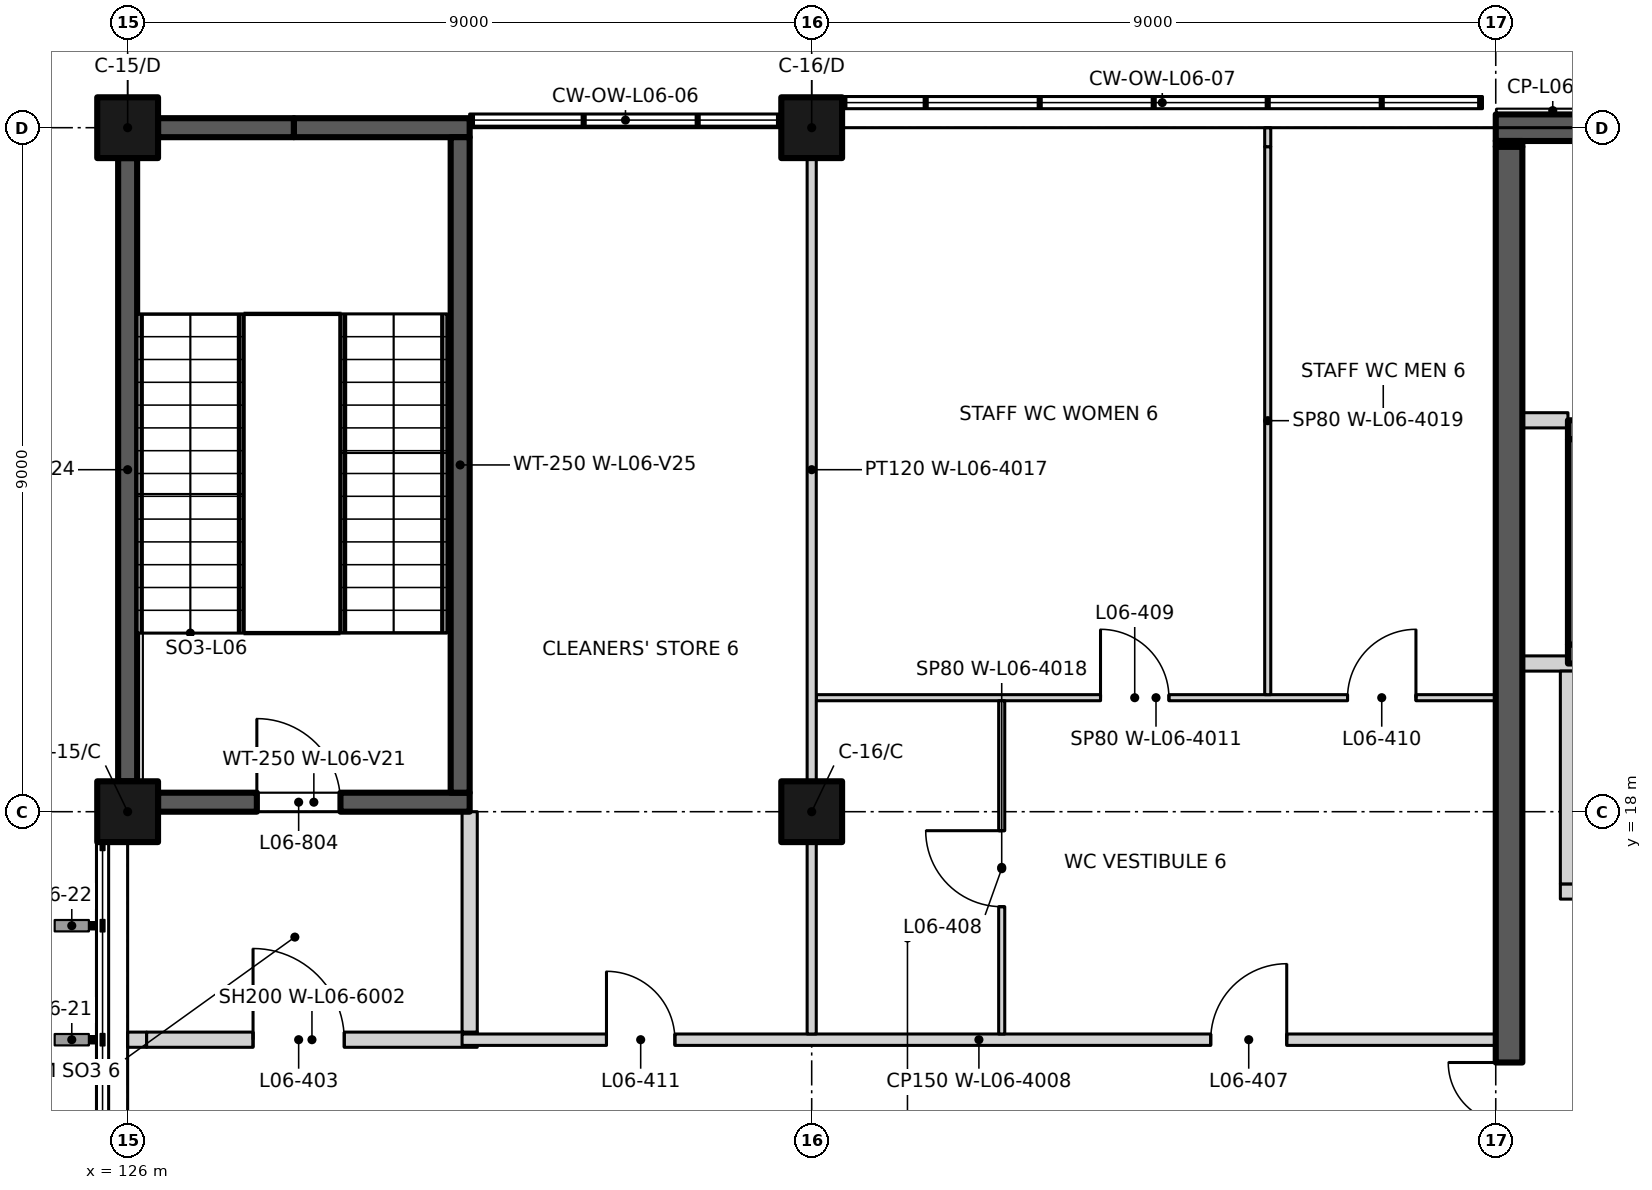
"""IFC4 building model, lengths in metres.
Left out: names, types, materials, properties, quantities, classifications, styles, units other than length and angle.
Written with IfcOpenShell. Run it as: python <this file> out.ifc"""

import sys

from ifc_helpers import new_model, si_unit, direction, frame, frame_2d, origin, origin_2d, place, context, subcontext, project, spatial, rectangle, extrude, element, fill, save


model = new_model("IFC4")
c1 = context("Model", 3, precision=1e-05, world=origin(), true_north=direction((0.0, 1.0)))
c2 = subcontext(c1, "Body", "Model", "MODEL_VIEW")
j1 = project(units=[si_unit("LENGTHUNIT", "METRE"), si_unit("PLANEANGLEUNIT", "RADIAN")], contexts=[c1])
p1 = place(None, origin())
s1 = spatial("IfcSite", under=j1, at=p1, CompositionType="ELEMENT")
p2 = place(p1, origin())
s2 = spatial("IfcBuilding", under=s1, at=p2, CompositionType="ELEMENT")
p3 = place(p2, frame((0.0, 0.0, 28.5)))
s3 = spatial("IfcBuildingStorey", under=s2, at=p3, CompositionType="ELEMENT", Elevation=28.5)
for number, where, z_axis, x_axis in (
    (1, (126.0, 18.0, 0.0), (0.0, 0.0, 1.0), (1.0, 0.0, 0.0)),
    (2, (135.0, 18.0, 0.0), (0.0, 0.0, 1.0), (1.0, 0.0, 0.0)),
    (3, (126.0, 27.0, 0.0), (0.0, 0.0, 1.0), (1.0, 0.0, 0.0)),
    (4, (135.0, 27.0, 0.0), (0.0, 0.0, 1.0), (1.0, 0.0, 0.0)),
):
    element("IfcColumn", number, at=place(p3, frame(where, z_axis=z_axis, x_axis=x_axis)), inside=s3, PredefinedType="COLUMN", context=c2, shape_type="SweptSolid", body=[
        extrude(rectangle(XDim=0.8, YDim=0.8, at=origin_2d()), origin(), (0.0, 0.0, 1.0), 4.5),
    ])
p4 = place(p3, frame((126.4, 18.125, 0.0), z_axis=(0.0, 0.0, 1.0), x_axis=(1.0, 0.0, 0.0)))
e5 = element("IfcWall", 5, at=p4, inside=s3, PredefinedType="SHEAR", context=c2, shape_type="SweptSolid", body=[
    extrude(rectangle(XDim=4.1, YDim=0.25, at=frame_2d((2.05, 0.0))), origin(), (0.0, 0.0, 1.0), 4.5),
])
p5 = place(p4, frame((1.3, 0.0, 0.0)))
e6 = element("IfcOpeningElement", 6, at=p5, cuts=e5, PredefinedType="OPENING", context=c2, shape_type="SweptSolid", body=[
    extrude(rectangle(XDim=1.1, YDim=2.1, at=frame_2d((0.55, 1.05))), frame((0.0, 0.135, 0.0), z_axis=(0.0, -1.0, 0.0), x_axis=(1.0, 0.0, 0.0)), (0.0, 0.0, 1.0), 0.27),
])
p6 = place(p3, frame((126.4, 27.0, 0.0), z_axis=(0.0, 0.0, 1.0), x_axis=(1.0, 0.0, 0.0)))
e7 = element("IfcWall", 7, at=p6, inside=s3, PredefinedType="SHEAR", context=c2, shape_type="SweptSolid", body=[
    extrude(rectangle(XDim=1.788, YDim=0.25, at=frame_2d((0.894, 0.0))), origin(), (0.0, 0.0, 1.0), 4.5),
])
p7 = place(p3, frame((128.188, 27.0, 0.0), z_axis=(0.0, 0.0, 1.0), x_axis=(1.0, 0.0, 0.0)))
e8 = element("IfcWall", 8, at=p7, inside=s3, PredefinedType="SHEAR", context=c2, shape_type="SweptSolid", body=[
    extrude(rectangle(XDim=2.312, YDim=0.25, at=frame_2d((1.156, 0.0))), origin(), (0.0, 0.0, 1.0), 4.5),
])
p8 = place(p3, frame((126.0, 18.4, 0.0), z_axis=(0.0, 0.0, 1.0), x_axis=(0.0, 1.0, 0.0)))
e9 = element("IfcWall", 9, at=p8, inside=s3, PredefinedType="SHEAR", context=c2, shape_type="SweptSolid", body=[
    extrude(rectangle(XDim=8.2, YDim=0.25, at=frame_2d((4.1, 0.0))), origin(), (0.0, 0.0, 1.0), 4.5),
])
p9 = place(p3, frame((130.375, 18.25, 0.0), z_axis=(0.0, 0.0, 1.0), x_axis=(0.0, 1.0, 0.0)))
e10 = element("IfcWall", 10, at=p9, inside=s3, PredefinedType="SHEAR", context=c2, shape_type="SweptSolid", body=[
    extrude(rectangle(XDim=8.625, YDim=0.25, at=frame_2d((4.312, 0.0))), origin(), (0.0, 0.0, 1.0), 4.5),
])
p10 = place(p3, frame((144.95, 20.075, 0.0), z_axis=(0.0, 0.0, 1.0), x_axis=(1.0, 0.0, 0.0)))
e11 = element("IfcWall", 11, at=p10, inside=s3, PredefinedType="SHEAR", context=c2, shape_type="SweptSolid", body=[
    extrude(rectangle(XDim=6.15, YDim=0.25, at=frame_2d((3.075, 0.0))), origin(), (0.0, 0.0, 1.0), 4.5),
])
p11 = place(p10, frame((1.05, 0.0, 0.0)))
e12 = element("IfcOpeningElement", 12, at=p11, cuts=e11, PredefinedType="OPENING", context=c2, shape_type="SweptSolid", body=[
    extrude(rectangle(XDim=1.1, YDim=2.1, at=frame_2d((0.55, 1.05))), frame((0.0, 0.135, 0.0), z_axis=(0.0, -1.0, 0.0), x_axis=(1.0, 0.0, 0.0)), (0.0, 0.0, 1.0), 0.27),
])
p12 = place(p10, frame((4.0, 0.0, 0.0)))
e13 = element("IfcOpeningElement", 13, at=p12, cuts=e11, PredefinedType="OPENING", context=c2, shape_type="SweptSolid", body=[
    extrude(rectangle(XDim=1.1, YDim=2.1, at=frame_2d((0.55, 1.05))), frame((0.0, 0.135, 0.0), z_axis=(0.0, -1.0, 0.0), x_axis=(1.0, 0.0, 0.0)), (0.0, 0.0, 1.0), 0.27),
])
p13 = place(p3, frame((144.95, 23.025, 0.0), z_axis=(0.0, 0.0, 1.0), x_axis=(1.0, 0.0, 0.0)))
e14 = element("IfcWall", 14, at=p13, inside=s3, PredefinedType="SHEAR", context=c2, shape_type="SweptSolid", body=[
    extrude(rectangle(XDim=6.15, YDim=0.25, at=frame_2d((3.075, 0.0))), origin(), (0.0, 0.0, 1.0), 4.5),
])
p14 = place(p3, frame((145.075, 20.2, 0.0), z_axis=(0.0, 0.0, 1.0), x_axis=(0.0, 1.0, 0.0)))
e15 = element("IfcWall", 15, at=p14, inside=s3, PredefinedType="SHEAR", context=c2, shape_type="SweptSolid", body=[
    extrude(rectangle(XDim=2.7, YDim=0.25, at=frame_2d((1.35, 0.0))), origin(), (0.0, 0.0, 1.0), 4.5),
])
p15 = place(p3, frame((144.0, 27.0, 0.0), z_axis=(0.0, 0.0, 1.0), x_axis=(1.0, 0.0, 0.0)))
e16 = element("IfcWall", 16, at=p15, inside=s3, PredefinedType="SOLIDWALL", context=c2, shape_type="SweptSolid", body=[
    extrude(rectangle(XDim=18.0, YDim=0.35, at=frame_2d((9.0, 0.0))), origin(), (0.0, 0.0, 1.0), 3.6),
])
p16 = place(p15, frame((4.2, 0.0, 0.6)))
e17 = element("IfcOpeningElement", 17, at=p16, cuts=e16, PredefinedType="OPENING", context=c2, shape_type="SweptSolid", body=[
    extrude(rectangle(XDim=0.6, YDim=2.4, at=frame_2d((0.3, 1.2))), frame((0.0, 0.185, 0.0), z_axis=(0.0, -1.0, 0.0), x_axis=(1.0, 0.0, 0.0)), (0.0, 0.0, 1.0), 0.37),
])
p17 = place(p15, frame((13.2, 0.0, 0.6)))
e18 = element("IfcOpeningElement", 18, at=p17, cuts=e16, PredefinedType="OPENING", context=c2, shape_type="SweptSolid", body=[
    extrude(rectangle(XDim=0.6, YDim=2.4, at=frame_2d((0.3, 1.2))), frame((0.0, 0.185, 0.0), z_axis=(0.0, -1.0, 0.0), x_axis=(1.0, 0.0, 0.0)), (0.0, 0.0, 1.0), 0.37),
])
p18 = place(p3, frame((126.0, 15.0, 0.0), z_axis=(0.0, 0.0, 1.0), x_axis=(1.0, 0.0, 0.0)))
e19 = element("IfcWall", 19, at=p18, inside=s3, PredefinedType="PARTITIONING", context=c2, shape_type="SweptSolid", body=[
    extrude(rectangle(XDim=0.25, YDim=0.2, at=frame_2d((0.125, 0.0))), origin(), (0.0, 0.0, 1.0), 3.6),
])
p19 = place(p3, frame((126.25, 15.0, 0.0), z_axis=(0.0, 0.0, 1.0), x_axis=(1.0, 0.0, 0.0)))
e20 = element("IfcWall", 20, at=p19, inside=s3, PredefinedType="PARTITIONING", context=c2, shape_type="SweptSolid", body=[
    extrude(rectangle(XDim=4.35, YDim=0.2, at=frame_2d((2.175, 0.0))), origin(), (0.0, 0.0, 1.0), 4.2),
])
p20 = place(p19, frame((1.4, 0.0, 0.0)))
e21 = element("IfcOpeningElement", 21, at=p20, cuts=e20, PredefinedType="OPENING", context=c2, shape_type="SweptSolid", body=[
    extrude(rectangle(XDim=1.2, YDim=2.1, at=frame_2d((0.6, 1.05))), frame((0.0, 0.11, 0.0), z_axis=(0.0, -1.0, 0.0), x_axis=(1.0, 0.0, 0.0)), (0.0, 0.0, 1.0), 0.22),
])
p21 = place(p3, frame((130.4, 15.0, 0.0), z_axis=(0.0, 0.0, 1.0), x_axis=(1.0, 0.0, 0.0)))
e22 = element("IfcWall", 22, at=p21, inside=s3, PredefinedType="PARTITIONING", context=c2, shape_type="SweptSolid", body=[
    extrude(rectangle(XDim=13.6, YDim=0.15, at=frame_2d((6.8, 0.0))), origin(), (0.0, 0.0, 1.0), 4.2),
])
p22 = place(p21, frame((9.85, 0.0, 0.0)))
e23 = element("IfcOpeningElement", 23, at=p22, cuts=e22, PredefinedType="OPENING", context=c2, shape_type="SweptSolid", body=[
    extrude(rectangle(XDim=1.0, YDim=2.1, at=frame_2d((0.5, 1.05))), frame((0.0, 0.085, 0.0), z_axis=(0.0, -1.0, 0.0), x_axis=(1.0, 0.0, 0.0)), (0.0, 0.0, 1.0), 0.17),
])
p23 = place(p21, frame((1.9, 0.0, 0.0)))
e24 = element("IfcOpeningElement", 24, at=p23, cuts=e22, PredefinedType="OPENING", context=c2, shape_type="SweptSolid", body=[
    extrude(rectangle(XDim=0.9, YDim=2.1, at=frame_2d((0.45, 1.05))), frame((0.0, 0.085, 0.0), z_axis=(0.0, -1.0, 0.0), x_axis=(1.0, 0.0, 0.0)), (0.0, 0.0, 1.0), 0.17),
])
p24 = place(p3, frame((144.85, 16.95, 0.0), z_axis=(0.0, 0.0, 1.0), x_axis=(1.0, 0.0, 0.0)))
e25 = element("IfcWall", 25, at=p24, inside=s3, PredefinedType="PARTITIONING", context=c2, shape_type="SweptSolid", body=[
    extrude(rectangle(XDim=6.35, YDim=0.2, at=frame_2d((3.175, 0.0))), origin(), (0.0, 0.0, 1.0), 4.2),
])
p25 = place(p24, frame((2.575, 0.0, 0.0)))
e26 = element("IfcOpeningElement", 26, at=p25, cuts=e25, PredefinedType="OPENING", context=c2, shape_type="SweptSolid", body=[
    extrude(rectangle(XDim=1.2, YDim=2.1, at=frame_2d((0.6, 1.05))), frame((0.0, 0.11, 0.0), z_axis=(0.0, -1.0, 0.0), x_axis=(1.0, 0.0, 0.0)), (0.0, 0.0, 1.0), 0.22),
])
p26 = place(p3, frame((135.06, 19.5, 0.0), z_axis=(0.0, 0.0, 1.0), x_axis=(1.0, 0.0, 0.0)))
e27 = element("IfcWall", 27, at=p26, inside=s3, PredefinedType="PARTITIONING", context=c2, shape_type="SweptSolid", body=[
    extrude(rectangle(XDim=8.94, YDim=0.08, at=frame_2d((4.47, 0.0))), origin(), (0.0, 0.0, 1.0), 4.2),
])
p27 = place(p26, frame((3.74, 0.0, 0.0)))
e28 = element("IfcOpeningElement", 28, at=p27, cuts=e27, PredefinedType="OPENING", context=c2, shape_type="SweptSolid", body=[
    extrude(rectangle(XDim=0.9, YDim=2.1, at=frame_2d((0.45, 1.05))), frame((0.0, 0.05, 0.0), z_axis=(0.0, -1.0, 0.0), x_axis=(1.0, 0.0, 0.0)), (0.0, 0.0, 1.0), 0.1),
])
p28 = place(p26, frame((6.99, 0.0, 0.0)))
e29 = element("IfcOpeningElement", 29, at=p28, cuts=e27, PredefinedType="OPENING", context=c2, shape_type="SweptSolid", body=[
    extrude(rectangle(XDim=0.9, YDim=2.1, at=frame_2d((0.45, 1.05))), frame((0.0, 0.05, 0.0), z_axis=(0.0, -1.0, 0.0), x_axis=(1.0, 0.0, 0.0)), (0.0, 0.0, 1.0), 0.1),
])
p29 = place(p3, frame((144.35, 19.95, 0.0), z_axis=(0.0, 0.0, 1.0), x_axis=(1.0, 0.0, 0.0)))
e30 = element("IfcWall", 30, at=p29, inside=s3, PredefinedType="PARTITIONING", context=c2, shape_type="SweptSolid", body=[
    extrude(rectangle(XDim=0.7, YDim=0.2, at=frame_2d((0.35, 0.0))), origin(), (0.0, 0.0, 1.0), 4.2),
])
p30 = place(p3, frame((144.35, 23.15, 0.0), z_axis=(0.0, 0.0, 1.0), x_axis=(1.0, 0.0, 0.0)))
e31 = element("IfcWall", 31, at=p30, inside=s3, PredefinedType="PARTITIONING", context=c2, shape_type="SweptSolid", body=[
    extrude(rectangle(XDim=0.6, YDim=0.2, at=frame_2d((0.3, 0.0))), origin(), (0.0, 0.0, 1.0), 4.2),
])
p31 = place(p3, frame((130.5, 15.1, 0.0), z_axis=(0.0, 0.0, 1.0), x_axis=(0.0, 1.0, 0.0)))
e32 = element("IfcWall", 32, at=p31, inside=s3, PredefinedType="PARTITIONING", context=c2, shape_type="SweptSolid", body=[
    extrude(rectangle(XDim=2.9, YDim=0.2, at=frame_2d((1.45, 0.0))), origin(), (0.0, 0.0, 1.0), 4.2),
])
p32 = place(p3, frame((135.0, 15.075, 0.0), z_axis=(0.0, 0.0, 1.0), x_axis=(0.0, 1.0, 0.0)))
e33 = element("IfcWall", 33, at=p32, inside=s3, PredefinedType="PARTITIONING", context=c2, shape_type="SweptSolid", body=[
    extrude(rectangle(XDim=2.525, YDim=0.12, at=frame_2d((1.263, 0.0))), origin(), (0.0, 0.0, 1.0), 4.2),
])
p33 = place(p3, frame((135.0, 18.4, 0.0), z_axis=(0.0, 0.0, 1.0), x_axis=(0.0, 1.0, 0.0)))
e34 = element("IfcWall", 34, at=p33, inside=s3, PredefinedType="PARTITIONING", context=c2, shape_type="SweptSolid", body=[
    extrude(rectangle(XDim=8.2, YDim=0.12, at=frame_2d((4.1, 0.0))), origin(), (0.0, 0.0, 1.0), 4.2),
])
p34 = place(p3, frame((137.5, 15.075, 0.0), z_axis=(0.0, 0.0, 1.0), x_axis=(0.0, 1.0, 0.0)))
e35 = element("IfcWall", 35, at=p34, inside=s3, PredefinedType="PARTITIONING", context=c2, shape_type="SweptSolid", body=[
    extrude(rectangle(XDim=4.385, YDim=0.08, at=frame_2d((2.192, 0.0))), origin(), (0.0, 0.0, 1.0), 4.2),
])
p35 = place(p34, frame((1.675, 0.0, 0.0)))
e36 = element("IfcOpeningElement", 36, at=p35, cuts=e35, PredefinedType="OPENING", context=c2, shape_type="SweptSolid", body=[
    extrude(rectangle(XDim=1.0, YDim=2.1, at=frame_2d((0.5, 1.05))), frame((0.0, 0.05, 0.0), z_axis=(0.0, -1.0, 0.0), x_axis=(1.0, 0.0, 0.0)), (0.0, 0.0, 1.0), 0.1),
])
p36 = place(p3, frame((141.0, 19.54, 0.0), z_axis=(0.0, 0.0, 1.0), x_axis=(0.0, 1.0, 0.0)))
e37 = element("IfcWall", 37, at=p36, inside=s3, PredefinedType="PARTITIONING", context=c2, shape_type="SweptSolid", body=[
    extrude(rectangle(XDim=7.21, YDim=0.08, at=frame_2d((3.605, 0.0))), origin(), (0.0, 0.0, 1.0), 4.2),
])
p37 = place(p3, frame((141.0, 26.75, 0.0), z_axis=(0.0, 0.0, 1.0), x_axis=(0.0, 1.0, 0.0)))
e38 = element("IfcWall", 38, at=p37, inside=s3, PredefinedType="PARTITIONING", context=c2, shape_type="SweptSolid", body=[
    extrude(rectangle(XDim=0.25, YDim=0.08, at=frame_2d((0.125, 0.0))), origin(), (0.0, 0.0, 1.0), 3.6),
])
p38 = place(p3, frame((144.175, 9.35, 0.0), z_axis=(0.0, 0.0, 1.0), x_axis=(0.0, 1.0, 0.0)))
e39 = element("IfcWall", 39, at=p38, inside=s3, PredefinedType="SHEAR", context=c2, shape_type="SweptSolid", body=[
    extrude(rectangle(XDim=17.4, YDim=0.35, at=frame_2d((8.7, 0.0))), origin(), (0.0, 0.0, 1.0), 4.2),
])
p39 = place(p38, frame((3.75, 0.0, 0.0)))
e40 = element("IfcOpeningElement", 40, at=p39, cuts=e39, PredefinedType="OPENING", context=c2, shape_type="SweptSolid", body=[
    extrude(rectangle(XDim=1.6, YDim=2.4, at=frame_2d((0.8, 1.2))), frame((0.0, 0.185, 0.0), z_axis=(0.0, -1.0, 0.0), x_axis=(1.0, 0.0, 0.0)), (0.0, 0.0, 1.0), 0.37),
])
p40 = place(p3, frame((144.175, 26.75, 0.0), z_axis=(0.0, 0.0, 1.0), x_axis=(0.0, 1.0, 0.0)))
e41 = element("IfcWall", 41, at=p40, inside=s3, PredefinedType="SHEAR", context=c2, shape_type="SweptSolid", body=[
    extrude(rectangle(XDim=0.075, YDim=0.35, at=frame_2d((0.038, 0.0))), origin(), (0.0, 0.0, 1.0), 3.6),
])
p41 = place(p3, frame((144.95, 17.05, 0.0), z_axis=(0.0, 0.0, 1.0), x_axis=(0.0, 1.0, 0.0)))
e42 = element("IfcWall", 42, at=p41, inside=s3, PredefinedType="PARTITIONING", context=c2, shape_type="SweptSolid", body=[
    extrude(rectangle(XDim=2.8, YDim=0.2, at=frame_2d((1.4, 0.0))), origin(), (0.0, 0.0, 1.0), 4.2),
])
p42 = place(p5, origin())
e43 = element("IfcDoor", 43, at=p42, inside=s3, OperationType="SINGLE_SWING_LEFT", PredefinedType="DOOR", context=c2, shape_type="SweptSolid", body=[
    extrude(rectangle(XDim=1.1, YDim=2.1, at=frame_2d((0.55, 1.05))), frame((0.0, 0.025, 0.0), z_axis=(0.0, -1.0, 0.0), x_axis=(1.0, 0.0, 0.0)), (0.0, 0.0, 1.0), 0.05),
])
fill(e6, e43)
p43 = place(p20, origin())
e44 = element("IfcDoor", 44, at=p43, inside=s3, OperationType="SINGLE_SWING_LEFT", PredefinedType="DOOR", context=c2, shape_type="SweptSolid", body=[
    extrude(rectangle(XDim=1.2, YDim=2.1, at=frame_2d((0.6, 1.05))), frame((0.0, 0.025, 0.0), z_axis=(0.0, -1.0, 0.0), x_axis=(1.0, 0.0, 0.0)), (0.0, 0.0, 1.0), 0.05),
])
fill(e21, e44)
p44 = place(p39, origin())
e45 = element("IfcDoor", 45, at=p44, inside=s3, OperationType="DOUBLE_DOOR_SINGLE_SWING", PredefinedType="DOOR", context=c2, shape_type="SweptSolid", body=[
    extrude(rectangle(XDim=1.6, YDim=2.4, at=frame_2d((0.8, 1.2))), frame((0.0, 0.025, 0.0), z_axis=(0.0, -1.0, 0.0), x_axis=(1.0, 0.0, 0.0)), (0.0, 0.0, 1.0), 0.05),
])
fill(e40, e45)
p45 = place(p22, origin())
e46 = element("IfcDoor", 46, at=p45, inside=s3, OperationType="SINGLE_SWING_RIGHT", PredefinedType="DOOR", context=c2, shape_type="SweptSolid", body=[
    extrude(rectangle(XDim=1.0, YDim=2.1, at=frame_2d((0.5, 1.05))), frame((0.0, 0.025, 0.0), z_axis=(0.0, -1.0, 0.0), x_axis=(1.0, 0.0, 0.0)), (0.0, 0.0, 1.0), 0.05),
])
fill(e23, e46)
p46 = place(p35, origin())
e47 = element("IfcDoor", 47, at=p46, inside=s3, OperationType="SINGLE_SWING_RIGHT", PredefinedType="DOOR", context=c2, shape_type="SweptSolid", body=[
    extrude(rectangle(XDim=1.0, YDim=2.1, at=frame_2d((0.5, 1.05))), frame((0.0, 0.025, 0.0), z_axis=(0.0, -1.0, 0.0), x_axis=(1.0, 0.0, 0.0)), (0.0, 0.0, 1.0), 0.05),
])
fill(e36, e47)
p47 = place(p27, origin())
e48 = element("IfcDoor", 48, at=p47, inside=s3, OperationType="SINGLE_SWING_LEFT", PredefinedType="DOOR", context=c2, shape_type="SweptSolid", body=[
    extrude(rectangle(XDim=0.9, YDim=2.1, at=frame_2d((0.45, 1.05))), frame((0.0, 0.025, 0.0), z_axis=(0.0, -1.0, 0.0), x_axis=(1.0, 0.0, 0.0)), (0.0, 0.0, 1.0), 0.05),
])
fill(e28, e48)
p48 = place(p28, origin())
e49 = element("IfcDoor", 49, at=p48, inside=s3, OperationType="SINGLE_SWING_RIGHT", PredefinedType="DOOR", context=c2, shape_type="SweptSolid", body=[
    extrude(rectangle(XDim=0.9, YDim=2.1, at=frame_2d((0.45, 1.05))), frame((0.0, 0.025, 0.0), z_axis=(0.0, -1.0, 0.0), x_axis=(1.0, 0.0, 0.0)), (0.0, 0.0, 1.0), 0.05),
])
fill(e29, e49)
p49 = place(p23, origin())
e50 = element("IfcDoor", 50, at=p49, inside=s3, OperationType="SINGLE_SWING_LEFT", PredefinedType="DOOR", context=c2, shape_type="SweptSolid", body=[
    extrude(rectangle(XDim=0.9, YDim=2.1, at=frame_2d((0.45, 1.05))), frame((0.0, 0.025, 0.0), z_axis=(0.0, -1.0, 0.0), x_axis=(1.0, 0.0, 0.0)), (0.0, 0.0, 1.0), 0.05),
])
fill(e24, e50)
save(model, sys.argv[1])
